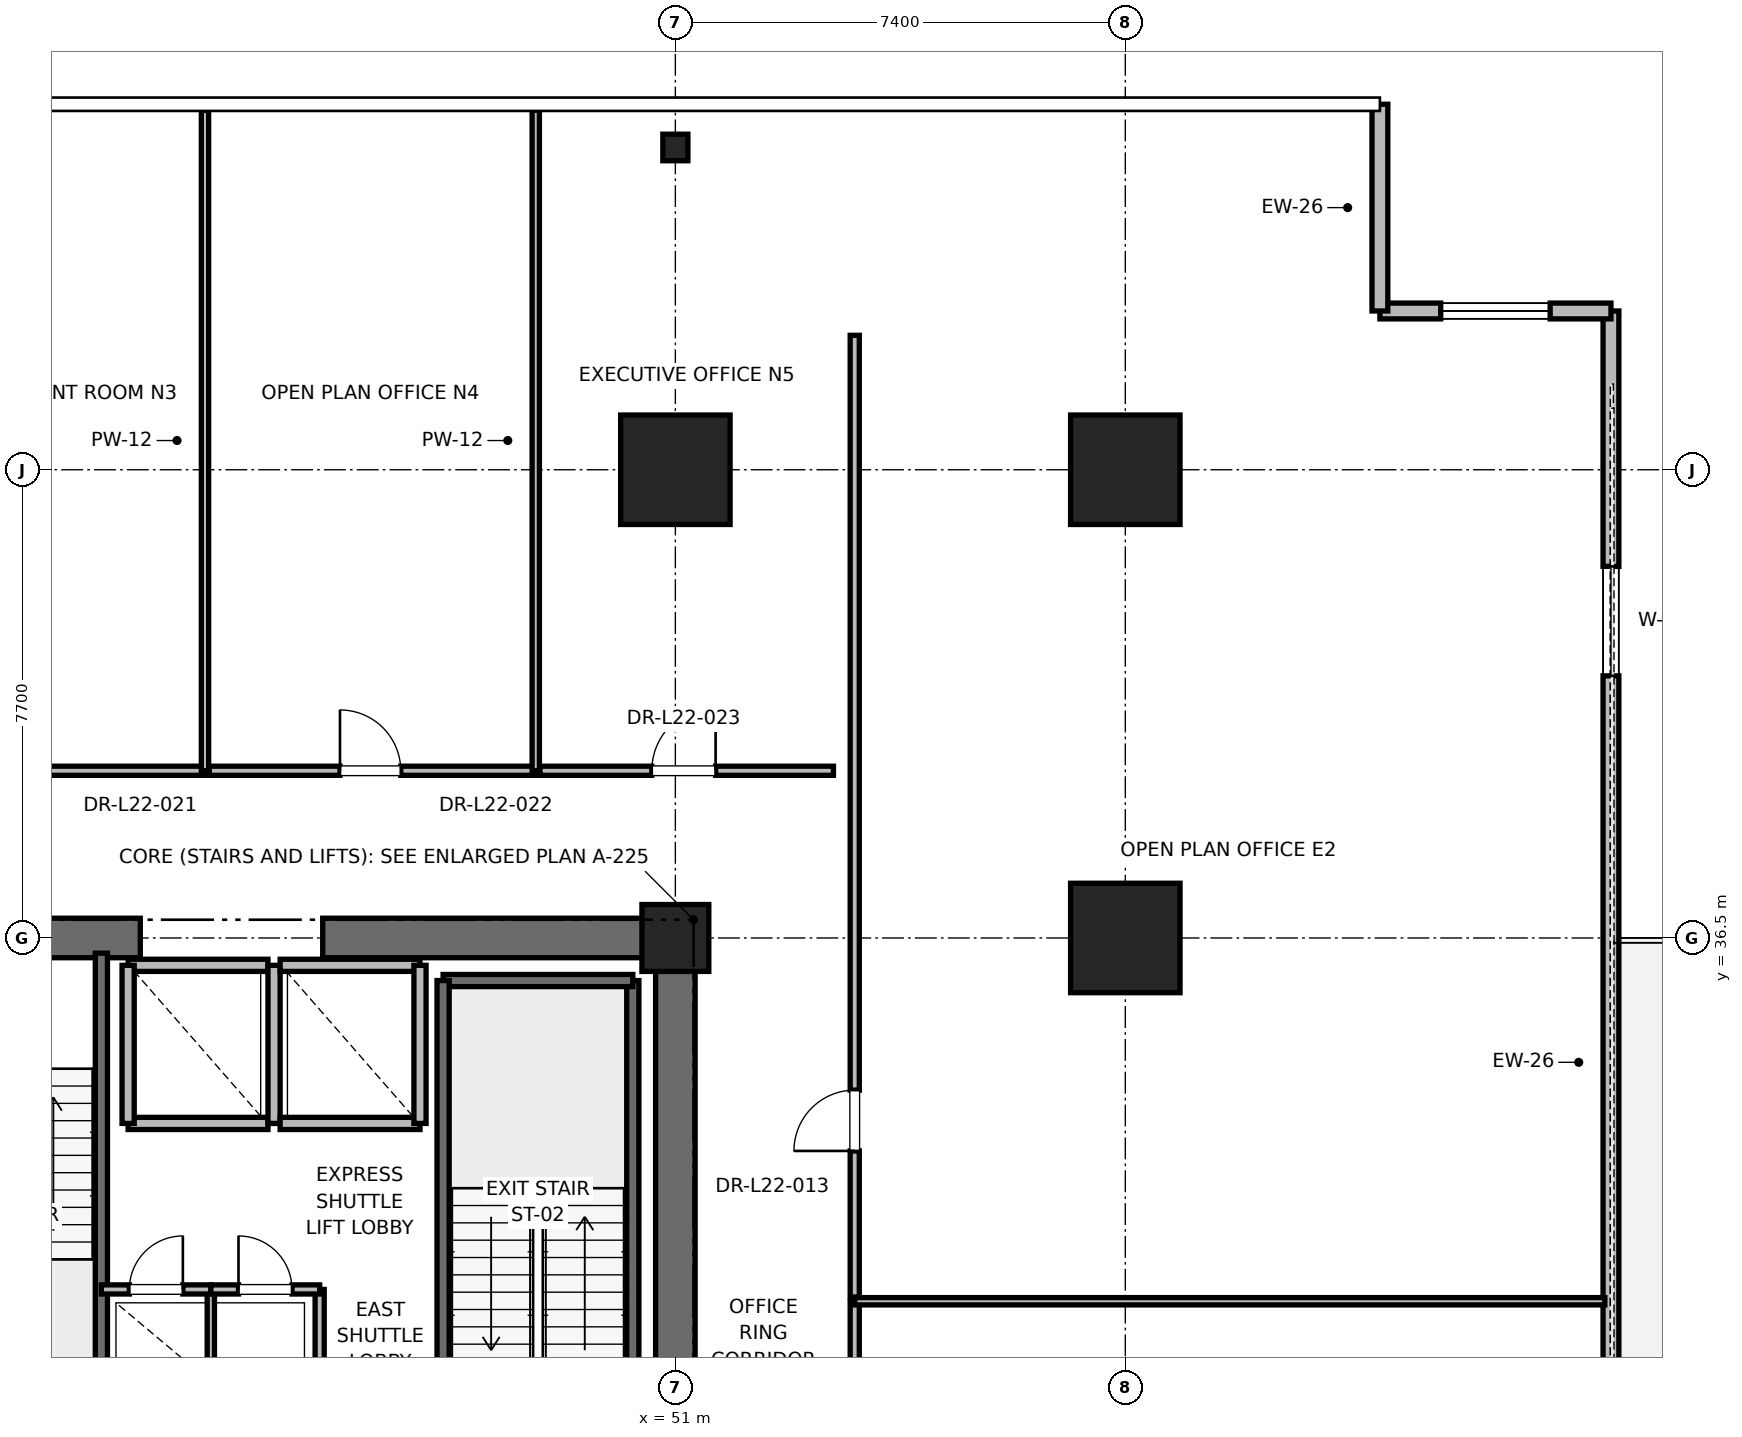
"""IFC4 building model, lengths in metres.
Left out: names, types, materials, properties, quantities, classifications, styles, units other than length and angle.
Written with IfcOpenShell. Run it as: python <this file> out.ifc"""

import sys

from ifc_helpers import new_model, si_unit, direction, frame, frame_2d, origin, origin_2d, place, context, subcontext, project, spatial, rectangle, i_section, extrude, element, fill, save


model = new_model("IFC4")
c1 = context("Model", 3, precision=1e-05, world=origin(), true_north=direction((0.0, 1.0)))
c2 = subcontext(c1, "Body", "Model", "MODEL_VIEW")
j1 = project(units=[si_unit("LENGTHUNIT", "METRE"), si_unit("PLANEANGLEUNIT", "RADIAN")], contexts=[c1])
p1 = place(None, origin())
s1 = spatial("IfcSite", under=j1, at=p1, CompositionType="ELEMENT")
p2 = place(p1, origin())
s2 = spatial("IfcBuilding", under=s1, at=p2, CompositionType="ELEMENT")
p3 = place(p2, frame((0.0, 0.0, 95.6)))
s3 = spatial("IfcBuildingStorey", under=s2, at=p3, CompositionType="ELEMENT", Elevation=95.6)
for number, where, z_axis, x_axis in (
    (1, (51.0, 44.2, 0.0), (0.0, 0.0, 1.0), (1.0, 0.0, 0.0)),
    (2, (58.4, 36.5, 0.0), (0.0, 0.0, 1.0), (1.0, 0.0, 0.0)),
    (3, (58.4, 44.2, 0.0), (0.0, 0.0, 1.0), (1.0, 0.0, 0.0)),
):
    element("IfcColumn", number, at=place(p3, frame(where, z_axis=z_axis, x_axis=x_axis)), inside=s3, PredefinedType="COLUMN", context=c2, shape_type="SweptSolid", body=[
        extrude(rectangle(XDim=1.8, YDim=1.8, at=origin_2d()), origin(), (0.0, 0.0, 1.0), 4.0),
    ])
p4 = place(p3, frame((51.0, 49.5, 0.0), z_axis=(0.0, 0.0, 1.0), x_axis=(1.0, 0.0, 0.0)))
e4 = element("IfcColumn", 4, at=p4, inside=s3, PredefinedType="COLUMN", context=c2, shape_type="SweptSolid", body=[
    extrude(i_section(OverallWidth=0.412, OverallDepth=0.437, WebThickness=0.036, FlangeThickness=0.058, FilletRadius=0.015, at=origin_2d()), origin(), (0.0, 0.0, 1.0), 4.0),
])
p5 = place(p3, frame((51.0, 36.5, 0.0), z_axis=(0.0, 0.0, 1.0), x_axis=(1.0, 0.0, 0.0)))
e5 = element("IfcColumn", 5, at=p5, inside=s3, PredefinedType="PILASTER", context=c2, shape_type="SweptSolid", body=[
    extrude(rectangle(XDim=1.1, YDim=1.1, at=origin_2d()), origin(), (0.0, 0.0, 1.0), 4.0),
])
p6 = place(p3, frame((37.8, 36.5, 0.0), z_axis=(0.0, 0.0, 1.0), x_axis=(1.0, 0.0, 0.0)))
e6 = element("IfcWall", 6, at=p6, inside=s3, PredefinedType="SHEAR", context=c2, shape_type="SweptSolid", body=[
    extrude(rectangle(XDim=4.4, YDim=0.65, at=frame_2d((2.2, 0.0))), origin(), (0.0, 0.0, 1.0), 3.76),
])
p7 = place(p6, frame((1.65, 0.0, 0.0)))
e7 = element("IfcOpeningElement", 7, at=p7, cuts=e6, PredefinedType="OPENING", context=c2, shape_type="SweptSolid", body=[
    extrude(rectangle(XDim=1.1, YDim=2.15, at=frame_2d((0.55, 1.075))), frame((0.0, 0.325, 0.0), z_axis=(0.0, -1.0, 0.0), x_axis=(1.0, 0.0, 0.0)), (0.0, 0.0, 1.0), 0.65),
])
p8 = place(p3, frame((45.2, 36.5, 0.0), z_axis=(0.0, 0.0, 1.0), x_axis=(1.0, 0.0, 0.0)))
e8 = element("IfcWall", 8, at=p8, inside=s3, PredefinedType="SHEAR", context=c2, shape_type="SweptSolid", body=[
    extrude(rectangle(XDim=5.8, YDim=0.65, at=frame_2d((2.9, 0.0))), origin(), (0.0, 0.0, 1.0), 3.76),
])
p9 = place(p3, frame((51.0, 27.7, 0.0), z_axis=(0.0, 0.0, 1.0), x_axis=(0.0, 1.0, 0.0)))
e9 = element("IfcWall", 9, at=p9, inside=s3, PredefinedType="SHEAR", context=c2, shape_type="SweptSolid", body=[
    extrude(rectangle(XDim=8.8, YDim=0.65, at=frame_2d((4.4, 0.0))), origin(), (0.0, 0.0, 1.0), 3.76),
])
p10 = place(p3, frame((66.387, 8.189, 0.0), z_axis=(0.0, 0.0, 1.0), x_axis=(0.0, 1.0, 0.0)))
e10 = element("IfcWall", 10, at=p10, inside=s3, PredefinedType="PARAPET", context=c2, shape_type="SweptSolid", body=[
    extrude(rectangle(XDim=38.622, YDim=0.26, at=frame_2d((19.311, 0.0))), origin(), (0.0, 0.0, 1.0), 2.889),
])
p11 = place(p10, frame((4.2, 0.0, 0.85)))
e11 = element("IfcOpeningElement", 11, at=p11, cuts=e10, PredefinedType="OPENING", context=c2, shape_type="SweptSolid", body=[
    extrude(rectangle(XDim=1.8, YDim=2.2, at=frame_2d((0.9, 1.1))), frame((0.0, 0.13, 0.0), z_axis=(0.0, -1.0, 0.0), x_axis=(1.0, 0.0, 0.0)), (0.0, 0.0, 1.0), 0.26),
])
p12 = place(p10, frame((18.711, 0.0, 0.0)))
e12 = element("IfcOpeningElement", 12, at=p12, cuts=e10, PredefinedType="OPENING", context=c2, shape_type="SweptSolid", body=[
    extrude(rectangle(XDim=1.2, YDim=2.2, at=frame_2d((0.6, 1.1))), frame((0.0, 0.13, 0.0), z_axis=(0.0, -1.0, 0.0), x_axis=(1.0, 0.0, 0.0)), (0.0, 0.0, 1.0), 0.26),
])
p13 = place(p10, frame((32.622, 0.0, 0.85)))
e13 = element("IfcOpeningElement", 13, at=p13, cuts=e10, PredefinedType="OPENING", context=c2, shape_type="SweptSolid", body=[
    extrude(rectangle(XDim=1.8, YDim=2.2, at=frame_2d((0.9, 1.1))), frame((0.0, 0.13, 0.0), z_axis=(0.0, -1.0, 0.0), x_axis=(1.0, 0.0, 0.0)), (0.0, 0.0, 1.0), 0.26),
])
p14 = place(p3, frame((66.387, 46.811, 0.0), z_axis=(0.0, 0.0, 1.0), x_axis=(-1.0, 0.0, 0.0)))
e14 = element("IfcWall", 14, at=p14, inside=s3, PredefinedType="PARAPET", context=c2, shape_type="SweptSolid", body=[
    extrude(rectangle(XDim=3.8, YDim=0.26, at=frame_2d((1.9, 0.0))), origin(), (0.0, 0.0, 1.0), 3.76),
])
p15 = place(p14, frame((1.0, 0.0, 0.85)))
e15 = element("IfcOpeningElement", 15, at=p15, cuts=e14, PredefinedType="OPENING", context=c2, shape_type="SweptSolid", body=[
    extrude(rectangle(XDim=1.8, YDim=2.2, at=frame_2d((0.9, 1.1))), frame((0.0, 0.13, 0.0), z_axis=(0.0, -1.0, 0.0), x_axis=(1.0, 0.0, 0.0)), (0.0, 0.0, 1.0), 0.26),
])
p16 = place(p3, frame((62.587, 46.811, 0.0), z_axis=(0.0, 0.0, 1.0), x_axis=(0.0, 1.0, 0.0)))
e16 = element("IfcWall", 16, at=p16, inside=s3, PredefinedType="PARAPET", context=c2, shape_type="SweptSolid", body=[
    extrude(rectangle(XDim=3.4, YDim=0.26, at=frame_2d((1.7, 0.0))), origin(), (0.0, 0.0, 1.0), 3.76),
])
p17 = place(p3, frame((50.3, 27.65, 0.0), z_axis=(0.0, 0.0, 1.0), x_axis=(0.0, 1.0, 0.0)))
e17 = element("IfcWall", 17, at=p17, inside=s3, PredefinedType="SOLIDWALL", context=c2, shape_type="SweptSolid", body=[
    extrude(rectangle(XDim=8.15, YDim=0.2, at=frame_2d((4.075, 0.0))), origin(), (0.0, 0.0, 1.0), 3.76),
])
p18 = place(p3, frame((47.18, 35.8, 0.0), z_axis=(0.0, 0.0, 1.0), x_axis=(1.0, 0.0, 0.0)))
e18 = element("IfcWall", 18, at=p18, inside=s3, PredefinedType="SOLIDWALL", context=c2, shape_type="SweptSolid", body=[
    extrude(rectangle(XDim=3.12, YDim=0.2, at=frame_2d((1.56, 0.0))), origin(), (0.0, 0.0, 1.0), 3.76),
])
p19 = place(p3, frame((47.18, 27.62, 0.0), z_axis=(0.0, 0.0, 1.0), x_axis=(0.0, 1.0, 0.0)))
e19 = element("IfcWall", 19, at=p19, inside=s3, PredefinedType="SOLIDWALL", context=c2, shape_type="SweptSolid", body=[
    extrude(rectangle(XDim=8.18, YDim=0.2, at=frame_2d((4.09, 0.0))), origin(), (0.0, 0.0, 1.0), 3.76),
])
p20 = place(p3, frame((41.56, 27.68, 0.0), z_axis=(0.0, 0.0, 1.0), x_axis=(0.0, 1.0, 0.0)))
e20 = element("IfcWall", 20, at=p20, inside=s3, PredefinedType="SOLIDWALL", context=c2, shape_type="SweptSolid", body=[
    extrude(rectangle(XDim=8.57, YDim=0.2, at=frame_2d((4.285, 0.0))), origin(), (0.0, 0.0, 1.0), 3.76),
])
p21 = place(p3, frame((42.0, 33.45, 0.0), z_axis=(0.0, 0.0, 1.0), x_axis=(1.0, 0.0, 0.0)))
e21 = element("IfcWall", 21, at=p21, inside=s3, PredefinedType="SOLIDWALL", context=c2, shape_type="SweptSolid", body=[
    extrude(rectangle(XDim=2.3, YDim=0.2, at=frame_2d((1.15, 0.0))), origin(), (0.0, 0.0, 1.0), 3.76),
])
p22 = place(p3, frame((44.3, 36.05, 0.0), z_axis=(0.0, 0.0, 1.0), x_axis=(-1.0, 0.0, 0.0)))
e22 = element("IfcWall", 22, at=p22, inside=s3, PredefinedType="SOLIDWALL", context=c2, shape_type="SweptSolid", body=[
    extrude(rectangle(XDim=2.3, YDim=0.2, at=frame_2d((1.15, 0.0))), origin(), (0.0, 0.0, 1.0), 2.54),
])
for number, where, z_axis, x_axis in (
    (23, (42.0, 36.05, 0.0), (0.0, 0.0, 1.0), (0.0, -1.0, 0.0)),
    (24, (44.4, 33.45, 0.0), (0.0, 0.0, 1.0), (0.0, 1.0, 0.0)),
):
    element("IfcWall", number, at=place(p3, frame(where, z_axis=z_axis, x_axis=x_axis)), inside=s3, PredefinedType="SOLIDWALL", context=c2, shape_type="SweptSolid", body=[
        extrude(rectangle(XDim=2.6, YDim=0.2, at=frame_2d((1.3, 0.0))), origin(), (0.0, 0.0, 1.0), 2.54),
    ])
p23 = place(p3, frame((44.5, 33.45, 0.0), z_axis=(0.0, 0.0, 1.0), x_axis=(1.0, 0.0, 0.0)))
e25 = element("IfcWall", 25, at=p23, inside=s3, PredefinedType="SOLIDWALL", context=c2, shape_type="SweptSolid", body=[
    extrude(rectangle(XDim=2.3, YDim=0.2, at=frame_2d((1.15, 0.0))), origin(), (0.0, 0.0, 1.0), 3.76),
])
p24 = place(p3, frame((46.8, 36.05, 0.0), z_axis=(0.0, 0.0, 1.0), x_axis=(-1.0, 0.0, 0.0)))
e26 = element("IfcWall", 26, at=p24, inside=s3, PredefinedType="SOLIDWALL", context=c2, shape_type="SweptSolid", body=[
    extrude(rectangle(XDim=2.3, YDim=0.2, at=frame_2d((1.15, 0.0))), origin(), (0.0, 0.0, 1.0), 2.54),
])
p25 = place(p3, frame((46.8, 33.45, 0.0), z_axis=(0.0, 0.0, 1.0), x_axis=(0.0, 1.0, 0.0)))
e27 = element("IfcWall", 27, at=p25, inside=s3, PredefinedType="SOLIDWALL", context=c2, shape_type="SweptSolid", body=[
    extrude(rectangle(XDim=2.6, YDim=0.2, at=frame_2d((1.3, 0.0))), origin(), (0.0, 0.0, 1.0), 3.76),
])
p26 = place(p3, frame((45.15, 27.62, 0.0), z_axis=(0.0, 0.0, 1.0), x_axis=(0.0, 1.0, 0.0)))
e28 = element("IfcWall", 28, at=p26, inside=s3, PredefinedType="PARTITIONING", context=c2, shape_type="SweptSolid", body=[
    extrude(rectangle(XDim=3.1, YDim=0.15, at=frame_2d((1.55, 0.0))), origin(), (0.0, 0.0, 1.0), 2.85),
])
p27 = place(p3, frame((43.36, 27.68, 0.0), z_axis=(0.0, 0.0, 1.0), x_axis=(0.0, 1.0, 0.0)))
e29 = element("IfcWall", 29, at=p27, inside=s3, PredefinedType="PARTITIONING", context=c2, shape_type="SweptSolid", body=[
    extrude(rectangle(XDim=3.04, YDim=0.12, at=frame_2d((1.52, 0.0))), origin(), (0.0, 0.0, 1.0), 2.85),
])
p28 = place(p3, frame((41.56, 30.72, 0.0), z_axis=(0.0, 0.0, 1.0), x_axis=(1.0, 0.0, 0.0)))
e30 = element("IfcWall", 30, at=p28, inside=s3, PredefinedType="PARTITIONING", context=c2, shape_type="SweptSolid", body=[
    extrude(rectangle(XDim=1.8, YDim=0.15, at=frame_2d((0.9, 0.0))), origin(), (0.0, 0.0, 1.0), 2.85),
])
p29 = place(p28, frame((0.46, 0.0, 0.0)))
e31 = element("IfcOpeningElement", 31, at=p29, cuts=e30, PredefinedType="OPENING", context=c2, shape_type="SweptSolid", body=[
    extrude(rectangle(XDim=0.88, YDim=2.1, at=frame_2d((0.44, 1.05))), frame((0.0, 0.075, 0.0), z_axis=(0.0, -1.0, 0.0), x_axis=(1.0, 0.0, 0.0)), (0.0, 0.0, 1.0), 0.15),
])
p30 = place(p3, frame((43.36, 30.72, 0.0), z_axis=(0.0, 0.0, 1.0), x_axis=(1.0, 0.0, 0.0)))
e32 = element("IfcWall", 32, at=p30, inside=s3, PredefinedType="PARTITIONING", context=c2, shape_type="SweptSolid", body=[
    extrude(rectangle(XDim=1.79, YDim=0.15, at=frame_2d((0.895, 0.0))), origin(), (0.0, 0.0, 1.0), 2.85),
])
p31 = place(p30, frame((0.455, 0.0, 0.0)))
e33 = element("IfcOpeningElement", 33, at=p31, cuts=e32, PredefinedType="OPENING", context=c2, shape_type="SweptSolid", body=[
    extrude(rectangle(XDim=0.88, YDim=2.1, at=frame_2d((0.44, 1.05))), frame((0.0, 0.075, 0.0), z_axis=(0.0, -1.0, 0.0), x_axis=(1.0, 0.0, 0.0)), (0.0, 0.0, 1.0), 0.15),
])
p32 = place(p3, frame((37.078, 39.25, 0.0), z_axis=(0.0, 0.0, 1.0), x_axis=(1.0, 0.0, 0.0)))
e34 = element("IfcWall", 34, at=p32, inside=s3, PredefinedType="PARTITIONING", context=c2, shape_type="SweptSolid", body=[
    extrude(rectangle(XDim=6.186, YDim=0.15, at=frame_2d((3.093, 0.0))), origin(), (0.0, 0.0, 1.0), 2.85),
])
p33 = place(p32, frame((2.558, 0.0, 0.0)))
e35 = element("IfcOpeningElement", 35, at=p33, cuts=e34, PredefinedType="OPENING", context=c2, shape_type="SweptSolid", body=[
    extrude(rectangle(XDim=1.0, YDim=2.15, at=frame_2d((0.5, 1.075))), frame((0.0, 0.075, 0.0), z_axis=(0.0, -1.0, 0.0), x_axis=(1.0, 0.0, 0.0)), (0.0, 0.0, 1.0), 0.15),
])
p34 = place(p3, frame((43.264, 39.25, 0.0), z_axis=(0.0, 0.0, 1.0), x_axis=(0.0, 1.0, 0.0)))
e36 = element("IfcWall", 36, at=p34, inside=s3, PredefinedType="PARTITIONING", context=c2, shape_type="SweptSolid", body=[
    extrude(rectangle(XDim=10.861, YDim=0.12, at=frame_2d((5.43, 0.0))), origin(), (0.0, 0.0, 1.0), 2.39),
])
p35 = place(p3, frame((43.334, 39.25, 0.0), z_axis=(0.0, 0.0, 1.0), x_axis=(1.0, 0.0, 0.0)))
e37 = element("IfcWall", 37, at=p35, inside=s3, PredefinedType="PARTITIONING", context=c2, shape_type="SweptSolid", body=[
    extrude(rectangle(XDim=5.37, YDim=0.15, at=frame_2d((2.685, 0.0))), origin(), (0.0, 0.0, 1.0), 2.85),
])
p36 = place(p35, frame((2.15, 0.0, 0.0)))
e38 = element("IfcOpeningElement", 38, at=p36, cuts=e37, PredefinedType="OPENING", context=c2, shape_type="SweptSolid", body=[
    extrude(rectangle(XDim=1.0, YDim=2.15, at=frame_2d((0.5, 1.075))), frame((0.0, 0.075, 0.0), z_axis=(0.0, -1.0, 0.0), x_axis=(1.0, 0.0, 0.0)), (0.0, 0.0, 1.0), 0.15),
])
p37 = place(p3, frame((48.704, 39.25, 0.0), z_axis=(0.0, 0.0, 1.0), x_axis=(0.0, 1.0, 0.0)))
e39 = element("IfcWall", 39, at=p37, inside=s3, PredefinedType="PARTITIONING", context=c2, shape_type="SweptSolid", body=[
    extrude(rectangle(XDim=10.861, YDim=0.12, at=frame_2d((5.43, 0.0))), origin(), (0.0, 0.0, 1.0), 2.39),
])
p38 = place(p3, frame((48.774, 39.25, 0.0), z_axis=(0.0, 0.0, 1.0), x_axis=(1.0, 0.0, 0.0)))
e40 = element("IfcWall", 40, at=p38, inside=s3, PredefinedType="PARTITIONING", context=c2, shape_type="SweptSolid", body=[
    extrude(rectangle(XDim=4.826, YDim=0.15, at=frame_2d((2.413, 0.0))), origin(), (0.0, 0.0, 1.0), 2.85),
])
p39 = place(p38, frame((1.838, 0.0, 0.0)))
e41 = element("IfcOpeningElement", 41, at=p39, cuts=e40, PredefinedType="OPENING", context=c2, shape_type="SweptSolid", body=[
    extrude(rectangle(XDim=1.05, YDim=2.2, at=frame_2d((0.525, 1.1))), frame((0.0, 0.075, 0.0), z_axis=(0.0, -1.0, 0.0), x_axis=(1.0, 0.0, 0.0)), (0.0, 0.0, 1.0), 0.15),
])
p40 = place(p3, frame((53.95, 8.589, 0.0), z_axis=(0.0, 0.0, 1.0), x_axis=(0.0, 1.0, 0.0)))
e42 = element("IfcWall", 42, at=p40, inside=s3, PredefinedType="PARTITIONING", context=c2, shape_type="SweptSolid", body=[
    extrude(rectangle(XDim=21.937, YDim=0.15, at=frame_2d((10.968, 0.0))), origin(), (0.0, 0.0, 1.0), 2.85),
])
p41 = place(p40, frame((15.439, 0.0, 0.0)))
e43 = element("IfcOpeningElement", 43, at=p41, cuts=e42, PredefinedType="OPENING", context=c2, shape_type="SweptSolid", body=[
    extrude(rectangle(XDim=1.0, YDim=2.15, at=frame_2d((0.5, 1.075))), frame((0.0, 0.075, 0.0), z_axis=(0.0, -1.0, 0.0), x_axis=(1.0, 0.0, 0.0)), (0.0, 0.0, 1.0), 0.15),
])
p42 = place(p3, frame((53.95, 30.526, 0.0), z_axis=(0.0, 0.0, 1.0), x_axis=(1.0, 0.0, 0.0)))
e44 = element("IfcWall", 44, at=p42, inside=s3, PredefinedType="PARTITIONING", context=c2, shape_type="SweptSolid", body=[
    extrude(rectangle(XDim=12.337, YDim=0.12, at=frame_2d((6.168, 0.0))), origin(), (0.0, 0.0, 1.0), 2.85),
])
p43 = place(p3, frame((53.95, 30.596, 0.0), z_axis=(0.0, 0.0, 1.0), x_axis=(0.0, 1.0, 0.0)))
e45 = element("IfcWall", 45, at=p43, inside=s3, PredefinedType="PARTITIONING", context=c2, shape_type="SweptSolid", body=[
    extrude(rectangle(XDim=15.815, YDim=0.15, at=frame_2d((7.908, 0.0))), origin(), (0.0, 0.0, 1.0), 2.85),
])
p44 = place(p43, frame((2.402, 0.0, 0.0)))
e46 = element("IfcOpeningElement", 46, at=p44, cuts=e45, PredefinedType="OPENING", context=c2, shape_type="SweptSolid", body=[
    extrude(rectangle(XDim=1.0, YDim=2.15, at=frame_2d((0.5, 1.075))), frame((0.0, 0.075, 0.0), z_axis=(0.0, -1.0, 0.0), x_axis=(1.0, 0.0, 0.0)), (0.0, 0.0, 1.0), 0.15),
])
p45 = place(p13, origin())
e47 = element("IfcWindow", 47, at=p45, inside=s3, PartitioningType="SINGLE_PANEL", PredefinedType="WINDOW", context=c2, shape_type="SweptSolid", body=[
    extrude(rectangle(XDim=1.8, YDim=2.2, at=frame_2d((0.9, 1.1))), frame((0.0, 0.03, 0.0), z_axis=(0.0, -1.0, 0.0), x_axis=(1.0, 0.0, 0.0)), (0.0, 0.0, 1.0), 0.06),
])
fill(e13, e47)
p46 = place(p15, origin())
e48 = element("IfcWindow", 48, at=p46, inside=s3, PartitioningType="SINGLE_PANEL", PredefinedType="WINDOW", context=c2, shape_type="SweptSolid", body=[
    extrude(rectangle(XDim=1.8, YDim=2.2, at=frame_2d((0.9, 1.1))), frame((0.0, 0.03, 0.0), z_axis=(0.0, -1.0, 0.0), x_axis=(1.0, 0.0, 0.0)), (0.0, 0.0, 1.0), 0.06),
])
fill(e15, e48)
p47 = place(p29, origin())
e49 = element("IfcDoor", 49, at=p47, inside=s3, OperationType="SINGLE_SWING_RIGHT", PredefinedType="DOOR", context=c2, shape_type="SweptSolid", body=[
    extrude(rectangle(XDim=0.88, YDim=2.1, at=frame_2d((0.44, 1.05))), frame((0.0, 0.025, 0.0), z_axis=(0.0, -1.0, 0.0), x_axis=(1.0, 0.0, 0.0)), (0.0, 0.0, 1.0), 0.05),
])
fill(e31, e49)
p48 = place(p31, origin())
e50 = element("IfcDoor", 50, at=p48, inside=s3, OperationType="SINGLE_SWING_LEFT", PredefinedType="DOOR", context=c2, shape_type="SweptSolid", body=[
    extrude(rectangle(XDim=0.88, YDim=2.1, at=frame_2d((0.44, 1.05))), frame((0.0, 0.025, 0.0), z_axis=(0.0, -1.0, 0.0), x_axis=(1.0, 0.0, 0.0)), (0.0, 0.0, 1.0), 0.05),
])
fill(e33, e50)
p49 = place(p36, origin())
e51 = element("IfcDoor", 51, at=p49, inside=s3, OperationType="SINGLE_SWING_LEFT", PredefinedType="DOOR", context=c2, shape_type="SweptSolid", body=[
    extrude(rectangle(XDim=1.0, YDim=2.15, at=frame_2d((0.5, 1.075))), frame((0.0, 0.025, 0.0), z_axis=(0.0, -1.0, 0.0), x_axis=(1.0, 0.0, 0.0)), (0.0, 0.0, 1.0), 0.05),
])
fill(e38, e51)
p50 = place(p39, origin())
e52 = element("IfcDoor", 52, at=p50, inside=s3, OperationType="SINGLE_SWING_RIGHT", PredefinedType="DOOR", context=c2, shape_type="SweptSolid", body=[
    extrude(rectangle(XDim=1.05, YDim=2.2, at=frame_2d((0.525, 1.1))), frame((0.0, 0.025, 0.0), z_axis=(0.0, -1.0, 0.0), x_axis=(1.0, 0.0, 0.0)), (0.0, 0.0, 1.0), 0.05),
])
fill(e41, e52)
p51 = place(p44, origin())
e53 = element("IfcDoor", 53, at=p51, inside=s3, OperationType="SINGLE_SWING_LEFT", PredefinedType="DOOR", context=c2, shape_type="SweptSolid", body=[
    extrude(rectangle(XDim=1.0, YDim=2.15, at=frame_2d((0.5, 1.075))), frame((0.0, 0.025, 0.0), z_axis=(0.0, -1.0, 0.0), x_axis=(1.0, 0.0, 0.0)), (0.0, 0.0, 1.0), 0.05),
])
fill(e46, e53)
save(model, sys.argv[1])
